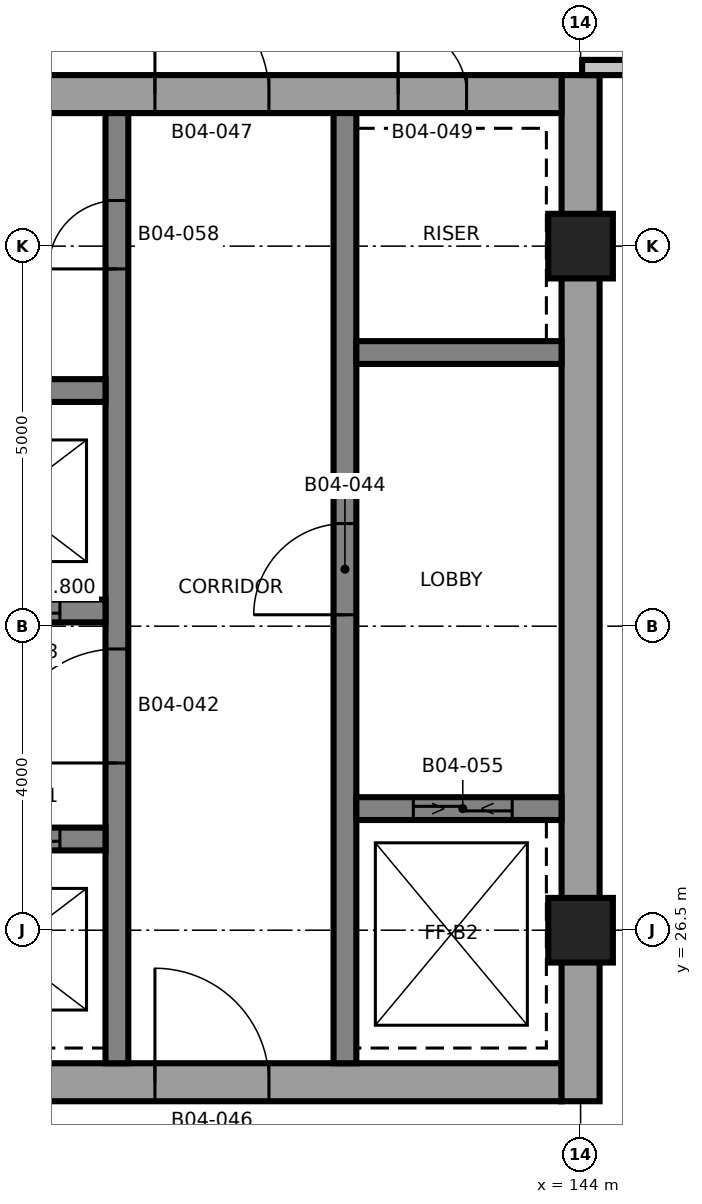
"""IFC4 building model, lengths in metres.
Left out: names, types, materials, properties, quantities, classifications, styles, units other than length and angle.
Written with IfcOpenShell. Run it as: python <this file> out.ifc"""

import sys

from ifc_helpers import new_model, si_unit, direction, frame, frame_2d, origin, origin_2d, place, context, subcontext, project, spatial, rectangle, extrude, element, fill, save


model = new_model("IFC4")
c1 = context("Model", 3, precision=1e-05, world=origin(), true_north=direction((0.0, 1.0)))
c2 = subcontext(c1, "Body", "Model", "MODEL_VIEW")
j1 = project(units=[si_unit("LENGTHUNIT", "METRE"), si_unit("PLANEANGLEUNIT", "RADIAN")], contexts=[c1])
p1 = place(None, origin())
s1 = spatial("IfcSite", under=j1, at=p1, CompositionType="ELEMENT")
p2 = place(p1, origin())
s2 = spatial("IfcBuilding", under=s1, at=p2, CompositionType="ELEMENT")
p3 = place(p2, frame((0.0, 0.0, 66.8)))
s3 = spatial("IfcBuildingStorey", under=s2, at=p3, CompositionType="ELEMENT", Elevation=66.8)
p4 = place(p3, frame((128.75, 24.5, 0.0), z_axis=(0.0, 0.0, 1.0), x_axis=(1.0, 0.0, 0.0)))
e1 = element("IfcWall", 1, at=p4, inside=s3, PredefinedType="SHEAR", context=c2, shape_type="SweptSolid", body=[
    extrude(rectangle(XDim=15.0, YDim=0.5, at=frame_2d((7.5, 0.0))), origin(), (0.0, 0.0, 1.0), 3.7),
])
p5 = place(p4, frame((9.65, 0.0, 0.0)))
e2 = element("IfcOpeningElement", 2, at=p5, cuts=e1, PredefinedType="OPENING", context=c2, shape_type="SweptSolid", body=[
    extrude(rectangle(XDim=1.5, YDim=2.1, at=frame_2d((0.75, 1.05))), frame((0.0, 0.26, 0.0), z_axis=(0.0, -1.0, 0.0), x_axis=(1.0, 0.0, 0.0)), (0.0, 0.0, 1.0), 0.52),
])
p6 = place(p4, frame((1.25, 0.0, 0.0)))
e3 = element("IfcOpeningElement", 3, at=p6, cuts=e1, PredefinedType="OPENING", context=c2, shape_type="SweptSolid", body=[
    extrude(rectangle(XDim=0.9, YDim=2.1, at=frame_2d((0.45, 1.05))), frame((0.0, 0.26, 0.0), z_axis=(0.0, -1.0, 0.0), x_axis=(1.0, 0.0, 0.0)), (0.0, 0.0, 1.0), 0.52),
])
p7 = place(p3, frame((144.0, 24.25, 0.0), z_axis=(0.0, 0.0, 1.0), x_axis=(0.0, 1.0, 0.0)))
e4 = element("IfcWall", 4, at=p7, inside=s3, PredefinedType="SHEAR", context=c2, shape_type="SweptSolid", body=[
    extrude(rectangle(XDim=13.5, YDim=0.5, at=frame_2d((6.75, 0.0))), origin(), (0.0, 0.0, 1.0), 3.7),
])
p8 = place(p3, frame((128.75, 37.5, 0.0), z_axis=(0.0, 0.0, 1.0), x_axis=(1.0, 0.0, 0.0)))
e5 = element("IfcWall", 5, at=p8, inside=s3, PredefinedType="SHEAR", context=c2, shape_type="SweptSolid", body=[
    extrude(rectangle(XDim=15.0, YDim=0.5, at=frame_2d((7.5, 0.0))), origin(), (0.0, 0.0, 1.0), 3.7),
])
p9 = place(p8, frame((9.65, 0.0, 0.0)))
e6 = element("IfcOpeningElement", 6, at=p9, cuts=e5, PredefinedType="OPENING", context=c2, shape_type="SweptSolid", body=[
    extrude(rectangle(XDim=1.5, YDim=2.1, at=frame_2d((0.75, 1.05))), frame((0.0, 0.26, 0.0), z_axis=(0.0, -1.0, 0.0), x_axis=(1.0, 0.0, 0.0)), (0.0, 0.0, 1.0), 0.52),
])
p10 = place(p8, frame((12.85, 0.0, 0.0)))
e7 = element("IfcOpeningElement", 7, at=p10, cuts=e5, PredefinedType="OPENING", context=c2, shape_type="SweptSolid", body=[
    extrude(rectangle(XDim=0.9, YDim=2.1, at=frame_2d((0.45, 1.05))), frame((0.0, 0.26, 0.0), z_axis=(0.0, -1.0, 0.0), x_axis=(1.0, 0.0, 0.0)), (0.0, 0.0, 1.0), 0.52),
])
p11 = place(p8, frame((3.6, 0.0, 0.0)))
e8 = element("IfcOpeningElement", 8, at=p11, cuts=e5, PredefinedType="OPENING", context=c2, shape_type="SweptSolid", body=[
    extrude(rectangle(XDim=0.9, YDim=2.1, at=frame_2d((0.45, 1.05))), frame((0.0, 0.26, 0.0), z_axis=(0.0, -1.0, 0.0), x_axis=(1.0, 0.0, 0.0)), (0.0, 0.0, 1.0), 0.52),
])
p12 = place(p8, frame((6.5, 0.0, 0.0)))
e9 = element("IfcOpeningElement", 9, at=p12, cuts=e5, PredefinedType="OPENING", context=c2, shape_type="SweptSolid", body=[
    extrude(rectangle(XDim=0.9, YDim=2.1, at=frame_2d((0.45, 1.05))), frame((0.0, 0.26, 0.0), z_axis=(0.0, -1.0, 0.0), x_axis=(1.0, 0.0, 0.0)), (0.0, 0.0, 1.0), 0.52),
])
p13 = place(p3, frame((137.9, 24.75, 0.0), z_axis=(0.0, 0.0, 1.0), x_axis=(0.0, 1.0, 0.0)))
e10 = element("IfcWall", 10, at=p13, inside=s3, PredefinedType="SHEAR", context=c2, shape_type="SweptSolid", body=[
    extrude(rectangle(XDim=12.5, YDim=0.3, at=frame_2d((6.25, 0.0))), origin(), (0.0, 0.0, 1.0), 3.7),
])
p14 = place(p13, frame((3.95, 0.0, 0.0)))
e11 = element("IfcOpeningElement", 11, at=p14, cuts=e10, PredefinedType="OPENING", context=c2, shape_type="SweptSolid", body=[
    extrude(rectangle(XDim=1.5, YDim=2.1, at=frame_2d((0.75, 1.05))), frame((0.0, 0.16, 0.0), z_axis=(0.0, -1.0, 0.0), x_axis=(1.0, 0.0, 0.0)), (0.0, 0.0, 1.0), 0.32),
])
p15 = place(p13, frame((10.45, 0.0, 0.0)))
e12 = element("IfcOpeningElement", 12, at=p15, cuts=e10, PredefinedType="OPENING", context=c2, shape_type="SweptSolid", body=[
    extrude(rectangle(XDim=0.9, YDim=2.1, at=frame_2d((0.45, 1.05))), frame((0.0, 0.16, 0.0), z_axis=(0.0, -1.0, 0.0), x_axis=(1.0, 0.0, 0.0)), (0.0, 0.0, 1.0), 0.32),
])
p16 = place(p3, frame((140.9, 24.75, 0.0), z_axis=(0.0, 0.0, 1.0), x_axis=(0.0, 1.0, 0.0)))
e13 = element("IfcWall", 13, at=p16, inside=s3, PredefinedType="SHEAR", context=c2, shape_type="SweptSolid", body=[
    extrude(rectangle(XDim=12.5, YDim=0.3, at=frame_2d((6.25, 0.0))), origin(), (0.0, 0.0, 1.0), 3.7),
])
p17 = place(p16, frame((5.9, 0.0, 0.0)))
e14 = element("IfcOpeningElement", 14, at=p17, cuts=e13, PredefinedType="OPENING", context=c2, shape_type="SweptSolid", body=[
    extrude(rectangle(XDim=1.2, YDim=2.1, at=frame_2d((0.6, 1.05))), frame((0.0, 0.16, 0.0), z_axis=(0.0, -1.0, 0.0), x_axis=(1.0, 0.0, 0.0)), (0.0, 0.0, 1.0), 0.32),
])
p18 = place(p3, frame((132.25, 27.7, 0.0), z_axis=(0.0, 0.0, 1.0), x_axis=(1.0, 0.0, 0.0)))
e15 = element("IfcWall", 15, at=p18, inside=s3, PredefinedType="SHEAR", context=c2, shape_type="SweptSolid", body=[
    extrude(rectangle(XDim=5.5, YDim=0.3, at=frame_2d((2.75, 0.0))), origin(), (0.0, 0.0, 1.0), 3.7),
])
p19 = place(p18, frame((0.9, 0.0, 0.0)))
e16 = element("IfcOpeningElement", 16, at=p19, cuts=e15, PredefinedType="OPENING", context=c2, shape_type="SweptSolid", body=[
    extrude(rectangle(XDim=1.1, YDim=2.4, at=frame_2d((0.55, 1.2))), frame((0.0, 0.16, 0.0), z_axis=(0.0, -1.0, 0.0), x_axis=(1.0, 0.0, 0.0)), (0.0, 0.0, 1.0), 0.32),
])
p20 = place(p18, frame((3.8, 0.0, 0.0)))
e17 = element("IfcOpeningElement", 17, at=p20, cuts=e15, PredefinedType="OPENING", context=c2, shape_type="SweptSolid", body=[
    extrude(rectangle(XDim=1.1, YDim=2.4, at=frame_2d((0.55, 1.2))), frame((0.0, 0.16, 0.0), z_axis=(0.0, -1.0, 0.0), x_axis=(1.0, 0.0, 0.0)), (0.0, 0.0, 1.0), 0.32),
])
p21 = place(p3, frame((132.25, 30.7, 0.0), z_axis=(0.0, 0.0, 1.0), x_axis=(1.0, 0.0, 0.0)))
e18 = element("IfcWall", 18, at=p21, inside=s3, PredefinedType="SHEAR", context=c2, shape_type="SweptSolid", body=[
    extrude(rectangle(XDim=5.5, YDim=0.3, at=frame_2d((2.75, 0.0))), origin(), (0.0, 0.0, 1.0), 3.7),
])
p22 = place(p21, frame((0.9, 0.0, 0.0)))
e19 = element("IfcOpeningElement", 19, at=p22, cuts=e18, PredefinedType="OPENING", context=c2, shape_type="SweptSolid", body=[
    extrude(rectangle(XDim=1.1, YDim=2.4, at=frame_2d((0.55, 1.2))), frame((0.0, 0.16, 0.0), z_axis=(0.0, -1.0, 0.0), x_axis=(1.0, 0.0, 0.0)), (0.0, 0.0, 1.0), 0.32),
])
p23 = place(p21, frame((3.8, 0.0, 0.0)))
e20 = element("IfcOpeningElement", 20, at=p23, cuts=e18, PredefinedType="OPENING", context=c2, shape_type="SweptSolid", body=[
    extrude(rectangle(XDim=1.1, YDim=2.4, at=frame_2d((0.55, 1.2))), frame((0.0, 0.16, 0.0), z_axis=(0.0, -1.0, 0.0), x_axis=(1.0, 0.0, 0.0)), (0.0, 0.0, 1.0), 0.32),
])
p24 = place(p3, frame((132.25, 33.6, 0.0), z_axis=(0.0, 0.0, 1.0), x_axis=(1.0, 0.0, 0.0)))
e21 = element("IfcWall", 21, at=p24, inside=s3, PredefinedType="SHEAR", context=c2, shape_type="SweptSolid", body=[
    extrude(rectangle(XDim=5.5, YDim=0.3, at=frame_2d((2.75, 0.0))), origin(), (0.0, 0.0, 1.0), 3.7),
])
p25 = place(p3, frame((141.05, 28.1, 0.0), z_axis=(0.0, 0.0, 1.0), x_axis=(1.0, 0.0, 0.0)))
e22 = element("IfcWall", 22, at=p25, inside=s3, PredefinedType="SHEAR", context=c2, shape_type="SweptSolid", body=[
    extrude(rectangle(XDim=2.7, YDim=0.3, at=frame_2d((1.35, 0.0))), origin(), (0.0, 0.0, 1.0), 3.7),
])
p26 = place(p25, frame((0.75, 0.0, 0.0)))
e23 = element("IfcOpeningElement", 23, at=p26, cuts=e22, PredefinedType="OPENING", context=c2, shape_type="SweptSolid", body=[
    extrude(rectangle(XDim=1.3, YDim=2.4, at=frame_2d((0.65, 1.2))), frame((0.0, 0.16, 0.0), z_axis=(0.0, -1.0, 0.0), x_axis=(1.0, 0.0, 0.0)), (0.0, 0.0, 1.0), 0.32),
])
p27 = place(p3, frame((141.05, 34.1, 0.0), z_axis=(0.0, 0.0, 1.0), x_axis=(1.0, 0.0, 0.0)))
e24 = element("IfcWall", 24, at=p27, inside=s3, PredefinedType="SHEAR", context=c2, shape_type="SweptSolid", body=[
    extrude(rectangle(XDim=2.7, YDim=0.3, at=frame_2d((1.35, 0.0))), origin(), (0.0, 0.0, 1.0), 3.7),
])
for number, where, z_axis, x_axis in (
    (25, (144.0, 26.5, 0.0), (0.0, 0.0, 1.0), (1.0, 0.0, 0.0)),
    (26, (144.0, 35.5, 0.0), (0.0, 0.0, 1.0), (1.0, 0.0, 0.0)),
):
    element("IfcColumn", number, at=place(p3, frame(where, z_axis=z_axis, x_axis=x_axis)), inside=s3, PredefinedType="COLUMN", context=c2, shape_type="SweptSolid", body=[
        extrude(rectangle(XDim=0.85, YDim=0.85, at=origin_2d()), origin(), (0.0, 0.0, 1.0), 3.7),
    ])
p28 = place(p3, frame((144.02, 37.85, 0.0), z_axis=(0.0, 0.0, 1.0), x_axis=(1.0, 0.0, 0.0)))
e27 = element("IfcWall", 27, at=p28, inside=s3, PredefinedType="PARTITIONING", context=c2, shape_type="SweptSolid", body=[
    extrude(rectangle(XDim=3.23, YDim=0.2, at=frame_2d((1.615, 0.0))), origin(), (0.0, 0.0, 1.0), 3.4),
])
p29 = place(p28, frame((1.03, 0.0, 0.0)))
e28 = element("IfcOpeningElement", 28, at=p29, cuts=e27, PredefinedType="OPENING", context=c2, shape_type="SweptSolid", body=[
    extrude(rectangle(XDim=1.5, YDim=2.1, at=frame_2d((0.75, 1.05))), frame((0.0, 0.11, 0.0), z_axis=(0.0, -1.0, 0.0), x_axis=(1.0, 0.0, 0.0)), (0.0, 0.0, 1.0), 0.22),
])
p30 = place(p14, origin())
e29 = element("IfcDoor", 29, at=p30, inside=s3, OperationType="SINGLE_SWING_RIGHT", PredefinedType="DOOR", context=c2, shape_type="SweptSolid", body=[
    extrude(rectangle(XDim=1.5, YDim=2.1, at=frame_2d((0.75, 1.05))), frame((0.0, 0.025, 0.0), z_axis=(0.0, -1.0, 0.0), x_axis=(1.0, 0.0, 0.0)), (0.0, 0.0, 1.0), 0.05),
])
fill(e11, e29)
p31 = place(p17, origin())
e30 = element("IfcDoor", 30, at=p31, inside=s3, OperationType="SINGLE_SWING_RIGHT", PredefinedType="DOOR", context=c2, shape_type="SweptSolid", body=[
    extrude(rectangle(XDim=1.2, YDim=2.1, at=frame_2d((0.6, 1.05))), frame((0.0, 0.025, 0.0), z_axis=(0.0, -1.0, 0.0), x_axis=(1.0, 0.0, 0.0)), (0.0, 0.0, 1.0), 0.05),
])
fill(e14, e30)
p32 = place(p5, origin())
e31 = element("IfcDoor", 31, at=p32, inside=s3, OperationType="SINGLE_SWING_LEFT", PredefinedType="DOOR", context=c2, shape_type="SweptSolid", body=[
    extrude(rectangle(XDim=1.5, YDim=2.1, at=frame_2d((0.75, 1.05))), frame((0.0, 0.025, 0.0), z_axis=(0.0, -1.0, 0.0), x_axis=(1.0, 0.0, 0.0)), (0.0, 0.0, 1.0), 0.05),
])
fill(e2, e31)
p33 = place(p9, origin())
e32 = element("IfcDoor", 32, at=p33, inside=s3, OperationType="SINGLE_SWING_RIGHT", PredefinedType="DOOR", context=c2, shape_type="SweptSolid", body=[
    extrude(rectangle(XDim=1.5, YDim=2.1, at=frame_2d((0.75, 1.05))), frame((0.0, 0.025, 0.0), z_axis=(0.0, -1.0, 0.0), x_axis=(1.0, 0.0, 0.0)), (0.0, 0.0, 1.0), 0.05),
])
fill(e6, e32)
p34 = place(p10, origin())
e33 = element("IfcDoor", 33, at=p34, inside=s3, OperationType="SINGLE_SWING_RIGHT", PredefinedType="DOOR", context=c2, shape_type="SweptSolid", body=[
    extrude(rectangle(XDim=0.9, YDim=2.1, at=frame_2d((0.45, 1.05))), frame((0.0, 0.025, 0.0), z_axis=(0.0, -1.0, 0.0), x_axis=(1.0, 0.0, 0.0)), (0.0, 0.0, 1.0), 0.05),
])
fill(e7, e33)
p35 = place(p20, origin())
e34 = element("IfcDoor", 34, at=p35, inside=s3, OperationType="SLIDING_TO_LEFT", PredefinedType="DOOR", context=c2, shape_type="SweptSolid", body=[
    extrude(rectangle(XDim=1.1, YDim=2.4, at=frame_2d((0.55, 1.2))), frame((0.0, 0.025, 0.0), z_axis=(0.0, -1.0, 0.0), x_axis=(1.0, 0.0, 0.0)), (0.0, 0.0, 1.0), 0.05),
])
fill(e17, e34)
p36 = place(p23, origin())
e35 = element("IfcDoor", 35, at=p36, inside=s3, OperationType="SLIDING_TO_LEFT", PredefinedType="DOOR", context=c2, shape_type="SweptSolid", body=[
    extrude(rectangle(XDim=1.1, YDim=2.4, at=frame_2d((0.55, 1.2))), frame((0.0, 0.025, 0.0), z_axis=(0.0, -1.0, 0.0), x_axis=(1.0, 0.0, 0.0)), (0.0, 0.0, 1.0), 0.05),
])
fill(e20, e35)
p37 = place(p26, origin())
e36 = element("IfcDoor", 36, at=p37, inside=s3, OperationType="SLIDING_TO_LEFT", PredefinedType="DOOR", context=c2, shape_type="SweptSolid", body=[
    extrude(rectangle(XDim=1.3, YDim=2.4, at=frame_2d((0.65, 1.2))), frame((0.0, 0.025, 0.0), z_axis=(0.0, -1.0, 0.0), x_axis=(1.0, 0.0, 0.0)), (0.0, 0.0, 1.0), 0.05),
])
fill(e23, e36)
p38 = place(p15, origin())
e37 = element("IfcDoor", 37, at=p38, inside=s3, OperationType="SINGLE_SWING_RIGHT", PredefinedType="DOOR", context=c2, shape_type="SweptSolid", body=[
    extrude(rectangle(XDim=0.9, YDim=2.1, at=frame_2d((0.45, 1.05))), frame((0.0, 0.025, 0.0), z_axis=(0.0, -1.0, 0.0), x_axis=(1.0, 0.0, 0.0)), (0.0, 0.0, 1.0), 0.05),
])
fill(e12, e37)
save(model, sys.argv[1])
